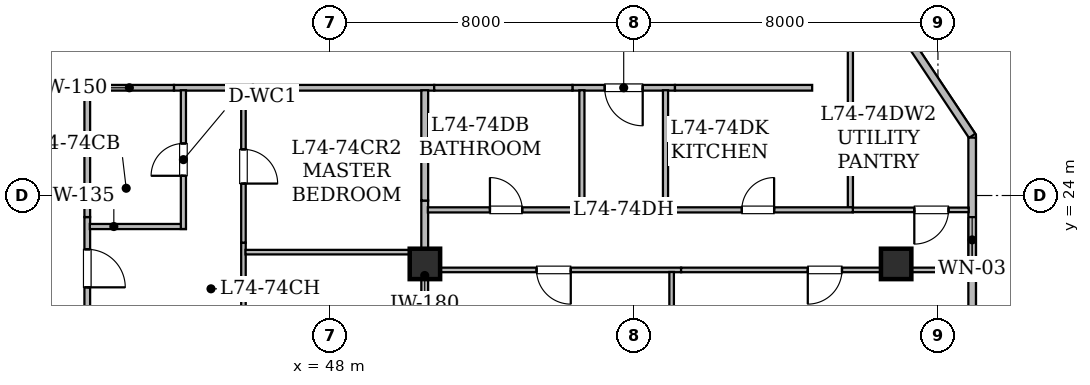
"""IFC4 building model, lengths in metres.
Left out: names, types, materials, properties, quantities, classifications, styles, units other than length and angle.
Written with IfcOpenShell. Run it as: python <this file> out.ifc"""

import sys

from ifc_helpers import new_model, si_unit, direction, frame, frame_2d, origin, origin_2d, place, context, subcontext, project, spatial, rectangle, hollow_rectangle, extrude, element, fill, save


model = new_model("IFC4")
c1 = context("Model", 3, precision=1e-05, world=origin(), true_north=direction((0.0, 1.0)))
c2 = subcontext(c1, "Body", "Model", "MODEL_VIEW")
j1 = project(units=[si_unit("LENGTHUNIT", "METRE"), si_unit("PLANEANGLEUNIT", "RADIAN")], contexts=[c1])
p1 = place(None, origin())
s1 = spatial("IfcSite", under=j1, at=p1, CompositionType="ELEMENT")
p2 = place(p1, origin())
s2 = spatial("IfcBuilding", under=s1, at=p2, CompositionType="ELEMENT")
p3 = place(p2, frame((0.0, 0.0, 290.45)))
s3 = spatial("IfcBuildingStorey", under=s2, at=p3, CompositionType="ELEMENT", Elevation=290.45)
p4 = place(p3, frame((62.9, 22.2, 0.0), z_axis=(0.0, 0.0, 1.0), x_axis=(1.0, 0.0, 0.0)))
e1 = element("IfcColumn", 1, at=p4, inside=s3, PredefinedType="COLUMN", context=c2, shape_type="SweptSolid", body=[
    extrude(hollow_rectangle(XDim=0.8, YDim=0.8, WallThickness=0.04, at=origin_2d()), origin(), (0.0, 0.0, 1.0), 4.175),
])
p5 = place(p3, frame((50.5, 22.2, 0.0), z_axis=(0.0, 0.0, 1.0), x_axis=(1.0, 0.0, 0.0)))
e2 = element("IfcColumn", 2, at=p5, inside=s3, PredefinedType="COLUMN", context=c2, shape_type="SweptSolid", body=[
    extrude(hollow_rectangle(XDim=0.8, YDim=0.8, WallThickness=0.04, at=origin_2d()), origin(), (0.0, 0.0, 1.0), 4.2),
])
p6 = place(p3, frame((63.326, 27.931, 0.0), z_axis=(0.0, 0.0, 1.0), x_axis=(0.554720052174, -0.832037056696, 0.0)))
e3 = element("IfcWall", 3, at=p6, inside=s3, PredefinedType="STANDARD", context=c2, shape_type="SweptSolid", body=[
    extrude(rectangle(XDim=2.837, YDim=0.2, at=frame_2d((1.419, 0.0))), origin(), (0.0, 0.0, 1.0), 3.78),
])
p7 = place(p3, frame((64.9, 25.524, 0.0), z_axis=(0.0, 0.0, 1.0), x_axis=(0.0, -1.0, 0.0)))
e4 = element("IfcWall", 4, at=p7, inside=s3, PredefinedType="STANDARD", context=c2, shape_type="SweptSolid", body=[
    extrude(rectangle(XDim=7.083, YDim=0.2, at=frame_2d((3.542, 0.0))), origin(), (0.0, 0.0, 1.0), 3.78),
])
p8 = place(p7, frame((2.092, 0.0, 0.78)))
e5 = element("IfcOpeningElement", 5, at=p8, cuts=e4, PredefinedType="OPENING", context=c2, shape_type="SweptSolid", body=[
    extrude(rectangle(XDim=1.2, YDim=1.5, at=frame_2d((0.6, 0.75))), frame((0.0, 0.11, 0.0), z_axis=(0.0, -1.0, 0.0), x_axis=(1.0, 0.0, 0.0)), (0.0, 0.0, 1.0), 0.22),
])
p9 = place(p3, frame((45.974, 26.835, 0.0), z_axis=(0.0, 0.0, 1.0), x_axis=(-1.0, 0.0, 0.0)))
e6 = element("IfcWall", 6, at=p9, inside=s3, PredefinedType="STANDARD", context=c2, shape_type="SweptSolid", body=[
    extrude(rectangle(XDim=2.078, YDim=0.15, at=frame_2d((1.039, 0.0))), origin(), (0.0, 0.0, 1.0), 3.78),
])
p10 = place(p3, frame((41.615, 23.433, 0.0), z_axis=(0.0, 0.0, 1.0), x_axis=(0.0, -1.0, 0.0)))
e7 = element("IfcWall", 7, at=p10, inside=s3, PredefinedType="STANDARD", context=c2, shape_type="SweptSolid", body=[
    extrude(rectangle(XDim=2.698, YDim=0.15, at=frame_2d((1.349, 0.0))), origin(), (0.0, 0.0, 1.0), 2.22),
])
p11 = place(p10, frame((0.849, 0.0, 0.0)))
e8 = element("IfcOpeningElement", 8, at=p11, cuts=e7, PredefinedType="OPENING", context=c2, shape_type="SweptSolid", body=[
    extrude(rectangle(XDim=1.0, YDim=2.15, at=frame_2d((0.5, 1.075))), frame((0.0, 0.085, 0.0), z_axis=(0.0, -1.0, 0.0), x_axis=(1.0, 0.0, 0.0)), (0.0, 0.0, 1.0), 0.17),
])
p12 = place(p3, frame((43.896, 26.835, 0.0), z_axis=(0.0, 0.0, 1.0), x_axis=(-1.0, 0.0, 0.0)))
e9 = element("IfcWall", 9, at=p12, inside=s3, PredefinedType="STANDARD", context=c2, shape_type="SweptSolid", body=[
    extrude(rectangle(XDim=2.346, YDim=0.15, at=frame_2d((1.173, 0.0))), origin(), (0.0, 0.0, 1.0), 3.78),
])
p13 = place(p3, frame((41.615, 26.898, 0.0), z_axis=(0.0, 0.0, 1.0), x_axis=(0.0, -1.0, 0.0)))
e10 = element("IfcWall", 10, at=p13, inside=s3, PredefinedType="STANDARD", context=c2, shape_type="SweptSolid", body=[
    extrude(rectangle(XDim=3.465, YDim=0.15, at=frame_2d((1.732, 0.0))), origin(), (0.0, 0.0, 1.0), 2.22),
])
p14 = place(p3, frame((50.744, 26.835, 0.0), z_axis=(0.0, 0.0, 1.0), x_axis=(-1.0, 0.0, 0.0)))
e11 = element("IfcWall", 11, at=p14, inside=s3, PredefinedType="STANDARD", context=c2, shape_type="SweptSolid", body=[
    extrude(rectangle(XDim=4.77, YDim=0.15, at=frame_2d((2.385, 0.0))), origin(), (0.0, 0.0, 1.0), 2.22),
])
p15 = place(p3, frame((57.08, 26.835, 0.0), z_axis=(0.0, 0.0, 1.0), x_axis=(-1.0, 0.0, 0.0)))
e12 = element("IfcWall", 12, at=p15, inside=s3, PredefinedType="STANDARD", context=c2, shape_type="SweptSolid", body=[
    extrude(rectangle(XDim=2.698, YDim=0.15, at=frame_2d((1.349, 0.0))), origin(), (0.0, 0.0, 1.0), 3.78),
])
p16 = place(p15, frame((0.849, 0.0, 0.0)))
e13 = element("IfcOpeningElement", 13, at=p16, cuts=e12, PredefinedType="OPENING", context=c2, shape_type="SweptSolid", body=[
    extrude(rectangle(XDim=1.0, YDim=2.15, at=frame_2d((0.5, 1.075))), frame((0.0, 0.085, 0.0), z_axis=(0.0, -1.0, 0.0), x_axis=(1.0, 0.0, 0.0)), (0.0, 0.0, 1.0), 0.17),
])
p17 = place(p3, frame((54.382, 26.835, 0.0), z_axis=(0.0, 0.0, 1.0), x_axis=(-1.0, 0.0, 0.0)))
e14 = element("IfcWall", 14, at=p17, inside=s3, PredefinedType="STANDARD", context=c2, shape_type="SweptSolid", body=[
    extrude(rectangle(XDim=3.638, YDim=0.15, at=frame_2d((1.819, 0.0))), origin(), (0.0, 0.0, 1.0), 2.22),
])
p18 = place(p3, frame((60.69, 26.835, 0.0), z_axis=(0.0, 0.0, 1.0), x_axis=(-1.0, 0.0, 0.0)))
e15 = element("IfcWall", 15, at=p18, inside=s3, PredefinedType="STANDARD", context=c2, shape_type="SweptSolid", body=[
    extrude(rectangle(XDim=3.61, YDim=0.15, at=frame_2d((1.805, 0.0))), origin(), (0.0, 0.0, 1.0), 3.78),
])
p19 = place(p3, frame((41.682, 23.184, 0.0), z_axis=(0.0, 0.0, 1.0), x_axis=(1.0, 0.0, 0.0)))
e16 = element("IfcWall", 16, at=p19, inside=s3, PredefinedType="PARTITIONING", context=c2, shape_type="SweptSolid", body=[
    extrude(rectangle(XDim=2.528, YDim=0.135, at=frame_2d((1.264, 0.0))), origin(), (0.0, 0.0, 1.0), 2.22),
])
p20 = place(p3, frame((44.145, 23.119, 0.0), z_axis=(0.0, 0.0, 1.0), x_axis=(0.0, 1.0, 0.0)))
e17 = element("IfcWall", 17, at=p20, inside=s3, PredefinedType="PARTITIONING", context=c2, shape_type="SweptSolid", body=[
    extrude(rectangle(XDim=3.651, YDim=0.135, at=frame_2d((1.826, 0.0))), origin(), (0.0, 0.0, 1.0), 2.22),
])
p21 = place(p20, frame((1.4, 0.0, 0.0)))
e18 = element("IfcOpeningElement", 18, at=p21, cuts=e17, PredefinedType="OPENING", context=c2, shape_type="SweptSolid", body=[
    extrude(rectangle(XDim=0.85, YDim=2.1, at=frame_2d((0.425, 1.05))), frame((0.0, 0.077, 0.0), z_axis=(0.0, -1.0, 0.0), x_axis=(1.0, 0.0, 0.0)), (0.0, 0.0, 1.0), 0.155),
])
p22 = place(p3, frame((45.725, 22.759, 0.0), z_axis=(0.0, 0.0, 1.0), x_axis=(0.0, -1.0, 0.0)))
e19 = element("IfcWall", 19, at=p22, inside=s3, PredefinedType="PARTITIONING", context=c2, shape_type="SweptSolid", body=[
    extrude(rectangle(XDim=7.367, YDim=0.12, at=frame_2d((3.684, 0.0))), origin(), (0.0, 0.0, 1.0), 2.22),
])
p23 = place(p22, frame((3.254, 0.0, 0.0)))
e20 = element("IfcOpeningElement", 20, at=p23, cuts=e19, PredefinedType="OPENING", context=c2, shape_type="SweptSolid", body=[
    extrude(rectangle(XDim=0.9, YDim=2.1, at=frame_2d((0.45, 1.05))), frame((0.0, 0.07, 0.0), z_axis=(0.0, -1.0, 0.0), x_axis=(1.0, 0.0, 0.0)), (0.0, 0.0, 1.0), 0.14),
])
p24 = place(p3, frame((45.725, 26.77, 0.0), z_axis=(0.0, 0.0, 1.0), x_axis=(0.0, -1.0, 0.0)))
e21 = element("IfcWall", 21, at=p24, inside=s3, PredefinedType="PARTITIONING", context=c2, shape_type="SweptSolid", body=[
    extrude(rectangle(XDim=4.011, YDim=0.12, at=frame_2d((2.005, 0.0))), origin(), (0.0, 0.0, 1.0), 2.22),
])
p25 = place(p24, frame((1.556, 0.0, 0.0)))
e22 = element("IfcOpeningElement", 22, at=p25, cuts=e21, PredefinedType="OPENING", context=c2, shape_type="SweptSolid", body=[
    extrude(rectangle(XDim=0.9, YDim=2.1, at=frame_2d((0.45, 1.05))), frame((0.0, 0.07, 0.0), z_axis=(0.0, -1.0, 0.0), x_axis=(1.0, 0.0, 0.0)), (0.0, 0.0, 1.0), 0.14),
])
p26 = place(p3, frame((45.779, 22.51, 0.0), z_axis=(0.0, 0.0, 1.0), x_axis=(1.0, 0.0, 0.0)))
e23 = element("IfcWall", 23, at=p26, inside=s3, PredefinedType="PARTITIONING", context=c2, shape_type="SweptSolid", body=[
    extrude(rectangle(XDim=4.651, YDim=0.12, at=frame_2d((2.325, 0.0))), origin(), (0.0, 0.0, 1.0), 2.22),
])
p27 = place(p3, frame((50.495, 22.445, 0.0), z_axis=(0.0, 0.0, 1.0), x_axis=(0.0, -1.0, 0.0)))
e24 = element("IfcWall", 24, at=p27, inside=s3, PredefinedType="STANDARD", context=c2, shape_type="SweptSolid", body=[
    extrude(rectangle(XDim=0.647, YDim=0.18, at=frame_2d((0.323, 0.0))), origin(), (0.0, 0.0, 1.0), 2.22),
])
p28 = place(p3, frame((50.495, 21.798, 0.0), z_axis=(0.0, 0.0, 1.0), x_axis=(0.0, -1.0, 0.0)))
e25 = element("IfcWall", 25, at=p28, inside=s3, PredefinedType="STANDARD", context=c2, shape_type="SweptSolid", body=[
    extrude(rectangle(XDim=6.406, YDim=0.18, at=frame_2d((3.203, 0.0))), origin(), (0.0, 0.0, 1.0), 2.22),
])
p29 = place(p3, frame((50.495, 23.867, 0.0), z_axis=(0.0, 0.0, 1.0), x_axis=(0.0, -1.0, 0.0)))
e26 = element("IfcWall", 26, at=p29, inside=s3, PredefinedType="STANDARD", context=c2, shape_type="SweptSolid", body=[
    extrude(rectangle(XDim=1.292, YDim=0.18, at=frame_2d((0.646, 0.0))), origin(), (0.0, 0.0, 1.0), 2.22),
])
p30 = place(p3, frame((50.495, 26.77, 0.0), z_axis=(0.0, 0.0, 1.0), x_axis=(0.0, -1.0, 0.0)))
e27 = element("IfcWall", 27, at=p30, inside=s3, PredefinedType="STANDARD", context=c2, shape_type="SweptSolid", body=[
    extrude(rectangle(XDim=2.903, YDim=0.18, at=frame_2d((1.452, 0.0))), origin(), (0.0, 0.0, 1.0), 2.22),
])
p31 = place(p3, frame((64.808, 23.622, 0.0), z_axis=(0.0, 0.0, 1.0), x_axis=(-1.0, 0.0, 0.0)))
e28 = element("IfcWall", 28, at=p31, inside=s3, PredefinedType="PARTITIONING", context=c2, shape_type="SweptSolid", body=[
    extrude(rectangle(XDim=3.047, YDim=0.12, at=frame_2d((1.523, 0.0))), origin(), (0.0, 0.0, 1.0), 2.22),
])
p32 = place(p31, frame((0.53, 0.0, 0.0)))
e29 = element("IfcOpeningElement", 29, at=p32, cuts=e28, PredefinedType="OPENING", context=c2, shape_type="SweptSolid", body=[
    extrude(rectangle(XDim=0.9, YDim=2.1, at=frame_2d((0.45, 1.05))), frame((0.0, 0.07, 0.0), z_axis=(0.0, -1.0, 0.0), x_axis=(1.0, 0.0, 0.0)), (0.0, 0.0, 1.0), 0.14),
])
p33 = place(p3, frame((61.696, 23.687, 0.0), z_axis=(0.0, 0.0, 1.0), x_axis=(0.0, 1.0, 0.0)))
e30 = element("IfcWall", 30, at=p33, inside=s3, PredefinedType="PARTITIONING", context=c2, shape_type="SweptSolid", body=[
    extrude(rectangle(XDim=5.683, YDim=0.135, at=frame_2d((2.842, 0.0))), origin(), (0.0, 0.0, 1.0), 2.22),
])
p34 = place(p3, frame((50.577, 23.622, 0.0), z_axis=(0.0, 0.0, 1.0), x_axis=(1.0, 0.0, 0.0)))
e31 = element("IfcWall", 31, at=p34, inside=s3, PredefinedType="PARTITIONING", context=c2, shape_type="SweptSolid", body=[
    extrude(rectangle(XDim=4.119, YDim=0.135, at=frame_2d((2.06, 0.0))), origin(), (0.0, 0.0, 1.0), 2.22),
])
p35 = place(p34, frame((1.634, 0.0, 0.0)))
e32 = element("IfcOpeningElement", 32, at=p35, cuts=e31, PredefinedType="OPENING", context=c2, shape_type="SweptSolid", body=[
    extrude(rectangle(XDim=0.85, YDim=2.1, at=frame_2d((0.425, 1.05))), frame((0.0, 0.077, 0.0), z_axis=(0.0, -1.0, 0.0), x_axis=(1.0, 0.0, 0.0)), (0.0, 0.0, 1.0), 0.155),
])
for number, where, z_axis, x_axis in (
    (33, (54.631, 23.557, 0.0), (0.0, 0.0, 1.0), (0.0, 1.0, 0.0)),
    (34, (56.831, 26.77, 0.0), (0.0, 0.0, 1.0), (0.0, -1.0, 0.0)),
):
    element("IfcWall", number, at=place(p3, frame(where, z_axis=z_axis, x_axis=x_axis)), inside=s3, PredefinedType="PARTITIONING", context=c2, shape_type="SweptSolid", body=[
        extrude(rectangle(XDim=3.213, YDim=0.135, at=frame_2d((1.606, 0.0))), origin(), (0.0, 0.0, 1.0), 3.78),
    ])
p36 = place(p3, frame((56.766, 23.622, 0.0), z_axis=(0.0, 0.0, 1.0), x_axis=(1.0, 0.0, 0.0)))
e35 = element("IfcWall", 35, at=p36, inside=s3, PredefinedType="PARTITIONING", context=c2, shape_type="SweptSolid", body=[
    extrude(rectangle(XDim=4.995, YDim=0.135, at=frame_2d((2.498, 0.0))), origin(), (0.0, 0.0, 1.0), 2.22),
])
p37 = place(p36, frame((2.073, 0.0, 0.0)))
e36 = element("IfcOpeningElement", 36, at=p37, cuts=e35, PredefinedType="OPENING", context=c2, shape_type="SweptSolid", body=[
    extrude(rectangle(XDim=0.85, YDim=2.1, at=frame_2d((0.425, 1.05))), frame((0.0, 0.077, 0.0), z_axis=(0.0, -1.0, 0.0), x_axis=(1.0, 0.0, 0.0)), (0.0, 0.0, 1.0), 0.155),
])
p38 = place(p3, frame((57.241, 22.042, 0.0), z_axis=(0.0, 0.0, 1.0), x_axis=(-1.0, 0.0, 0.0)))
e37 = element("IfcWall", 37, at=p38, inside=s3, PredefinedType="PARTITIONING", context=c2, shape_type="SweptSolid", body=[
    extrude(rectangle(XDim=6.664, YDim=0.12, at=frame_2d((3.332, 0.0))), origin(), (0.0, 0.0, 1.0), 2.22),
])
p39 = place(p38, frame((2.903, 0.0, 0.0)))
e38 = element("IfcOpeningElement", 38, at=p39, cuts=e37, PredefinedType="OPENING", context=c2, shape_type="SweptSolid", body=[
    extrude(rectangle(XDim=0.9, YDim=2.1, at=frame_2d((0.45, 1.05))), frame((0.0, 0.07, 0.0), z_axis=(0.0, -1.0, 0.0), x_axis=(1.0, 0.0, 0.0)), (0.0, 0.0, 1.0), 0.14),
])
p40 = place(p3, frame((64.808, 22.042, 0.0), z_axis=(0.0, 0.0, 1.0), x_axis=(-1.0, 0.0, 0.0)))
e39 = element("IfcWall", 39, at=p40, inside=s3, PredefinedType="PARTITIONING", context=c2, shape_type="SweptSolid", body=[
    extrude(rectangle(XDim=7.567, YDim=0.12, at=frame_2d((3.784, 0.0))), origin(), (0.0, 0.0, 1.0), 2.22),
])
p41 = place(p40, frame((3.333, 0.0, 0.0)))
e40 = element("IfcOpeningElement", 40, at=p41, cuts=e39, PredefinedType="OPENING", context=c2, shape_type="SweptSolid", body=[
    extrude(rectangle(XDim=0.9, YDim=2.1, at=frame_2d((0.45, 1.05))), frame((0.0, 0.07, 0.0), z_axis=(0.0, -1.0, 0.0), x_axis=(1.0, 0.0, 0.0)), (0.0, 0.0, 1.0), 0.14),
])
p42 = place(p3, frame((56.992, 21.988, 0.0), z_axis=(0.0, 0.0, 1.0), x_axis=(0.0, -1.0, 0.0)))
e41 = element("IfcWall", 41, at=p42, inside=s3, PredefinedType="PARTITIONING", context=c2, shape_type="SweptSolid", body=[
    extrude(rectangle(XDim=6.596, YDim=0.12, at=frame_2d((3.298, 0.0))), origin(), (0.0, 0.0, 1.0), 2.22),
])
p43 = place(p8, origin())
e42 = element("IfcWindow", 42, at=p43, inside=s3, PartitioningType="SINGLE_PANEL", PredefinedType="WINDOW", context=c2, shape_type="SweptSolid", body=[
    extrude(rectangle(XDim=1.2, YDim=1.5, at=frame_2d((0.6, 0.75))), frame((0.0, 0.03, 0.0), z_axis=(0.0, -1.0, 0.0), x_axis=(1.0, 0.0, 0.0)), (0.0, 0.0, 1.0), 0.06),
])
fill(e5, e42)
p44 = place(p11, origin())
e43 = element("IfcDoor", 43, at=p44, inside=s3, OperationType="SINGLE_SWING_RIGHT", PredefinedType="DOOR", context=c2, shape_type="SweptSolid", body=[
    extrude(rectangle(XDim=1.0, YDim=2.15, at=frame_2d((0.5, 1.075))), frame((0.0, 0.025, 0.0), z_axis=(0.0, -1.0, 0.0), x_axis=(1.0, 0.0, 0.0)), (0.0, 0.0, 1.0), 0.05),
])
fill(e8, e43)
p45 = place(p16, origin())
e44 = element("IfcDoor", 44, at=p45, inside=s3, OperationType="SINGLE_SWING_LEFT", PredefinedType="DOOR", context=c2, shape_type="SweptSolid", body=[
    extrude(rectangle(XDim=1.0, YDim=2.15, at=frame_2d((0.5, 1.075))), frame((0.0, 0.025, 0.0), z_axis=(0.0, -1.0, 0.0), x_axis=(1.0, 0.0, 0.0)), (0.0, 0.0, 1.0), 0.05),
])
fill(e13, e44)
p46 = place(p21, origin())
e45 = element("IfcDoor", 45, at=p46, inside=s3, OperationType="SINGLE_SWING_LEFT", PredefinedType="DOOR", context=c2, shape_type="SweptSolid", body=[
    extrude(rectangle(XDim=0.85, YDim=2.1, at=frame_2d((0.425, 1.05))), frame((0.0, 0.025, 0.0), z_axis=(0.0, -1.0, 0.0), x_axis=(1.0, 0.0, 0.0)), (0.0, 0.0, 1.0), 0.05),
])
fill(e18, e45)
p47 = place(p25, origin())
e46 = element("IfcDoor", 46, at=p47, inside=s3, OperationType="SINGLE_SWING_RIGHT", PredefinedType="DOOR", context=c2, shape_type="SweptSolid", body=[
    extrude(rectangle(XDim=0.9, YDim=2.1, at=frame_2d((0.45, 1.05))), frame((0.0, 0.025, 0.0), z_axis=(0.0, -1.0, 0.0), x_axis=(1.0, 0.0, 0.0)), (0.0, 0.0, 1.0), 0.05),
])
fill(e22, e46)
p48 = place(p32, origin())
e47 = element("IfcDoor", 47, at=p48, inside=s3, OperationType="SINGLE_SWING_RIGHT", PredefinedType="DOOR", context=c2, shape_type="SweptSolid", body=[
    extrude(rectangle(XDim=0.9, YDim=2.1, at=frame_2d((0.45, 1.05))), frame((0.0, 0.025, 0.0), z_axis=(0.0, -1.0, 0.0), x_axis=(1.0, 0.0, 0.0)), (0.0, 0.0, 1.0), 0.05),
])
fill(e29, e47)
p49 = place(p35, origin())
e48 = element("IfcDoor", 48, at=p49, inside=s3, OperationType="SINGLE_SWING_LEFT", PredefinedType="DOOR", context=c2, shape_type="SweptSolid", body=[
    extrude(rectangle(XDim=0.85, YDim=2.1, at=frame_2d((0.425, 1.05))), frame((0.0, 0.025, 0.0), z_axis=(0.0, -1.0, 0.0), x_axis=(1.0, 0.0, 0.0)), (0.0, 0.0, 1.0), 0.05),
])
fill(e32, e48)
p50 = place(p37, origin())
e49 = element("IfcDoor", 49, at=p50, inside=s3, OperationType="SINGLE_SWING_RIGHT", PredefinedType="DOOR", context=c2, shape_type="SweptSolid", body=[
    extrude(rectangle(XDim=0.85, YDim=2.1, at=frame_2d((0.425, 1.05))), frame((0.0, 0.025, 0.0), z_axis=(0.0, -1.0, 0.0), x_axis=(1.0, 0.0, 0.0)), (0.0, 0.0, 1.0), 0.05),
])
fill(e36, e49)
p51 = place(p39, origin())
e50 = element("IfcDoor", 50, at=p51, inside=s3, OperationType="SINGLE_SWING_LEFT", PredefinedType="DOOR", context=c2, shape_type="SweptSolid", body=[
    extrude(rectangle(XDim=0.9, YDim=2.1, at=frame_2d((0.45, 1.05))), frame((0.0, 0.025, 0.0), z_axis=(0.0, -1.0, 0.0), x_axis=(1.0, 0.0, 0.0)), (0.0, 0.0, 1.0), 0.05),
])
fill(e38, e50)
p52 = place(p41, origin())
e51 = element("IfcDoor", 51, at=p52, inside=s3, OperationType="SINGLE_SWING_RIGHT", PredefinedType="DOOR", context=c2, shape_type="SweptSolid", body=[
    extrude(rectangle(XDim=0.9, YDim=2.1, at=frame_2d((0.45, 1.05))), frame((0.0, 0.025, 0.0), z_axis=(0.0, -1.0, 0.0), x_axis=(1.0, 0.0, 0.0)), (0.0, 0.0, 1.0), 0.05),
])
fill(e40, e51)
save(model, sys.argv[1])
